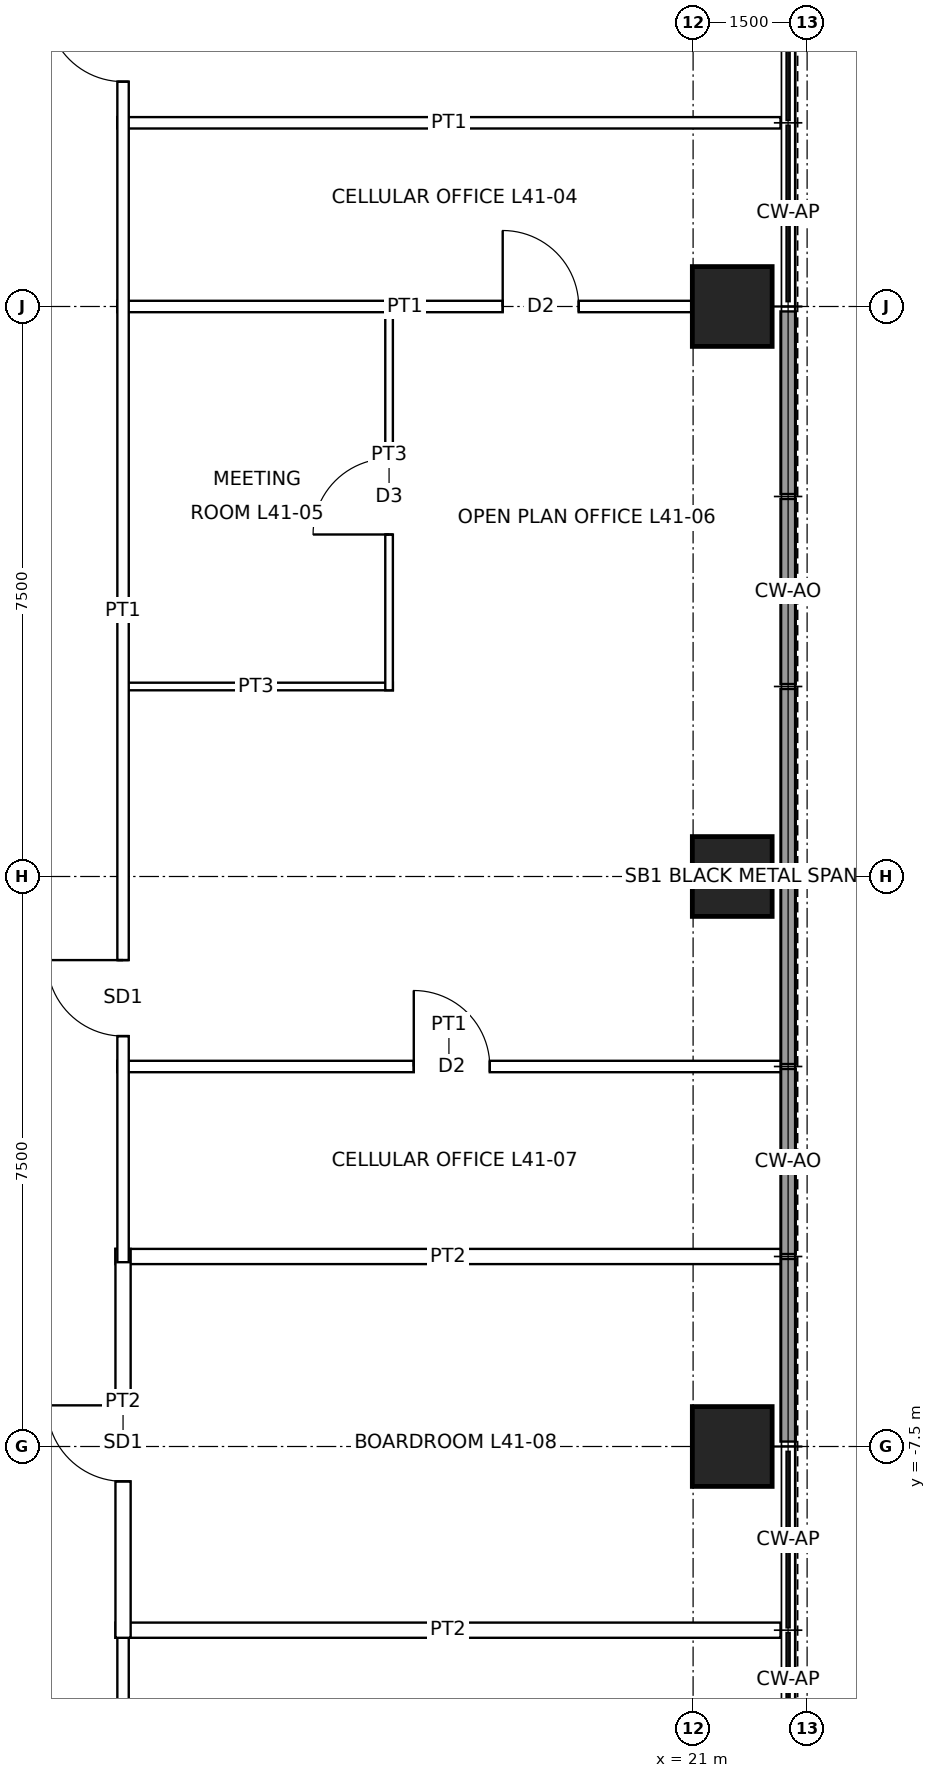
"""IFC4 building model, lengths in metres.
Left out: names, types, materials, properties, quantities, classifications, styles, units other than length and angle.
Written with IfcOpenShell. Run it as: python <this file> out.ifc"""

import sys

from ifc_helpers import new_model, si_unit, direction, frame, frame_2d, origin, origin_2d, place, context, subcontext, project, spatial, rectangle, hollow_rectangle, extrude, element, fill, save


model = new_model("IFC4")
c1 = context("Model", 3, precision=1e-05, world=origin(), true_north=direction((0.0, 1.0)))
c2 = subcontext(c1, "Body", "Model", "MODEL_VIEW")
j1 = project(units=[si_unit("LENGTHUNIT", "METRE"), si_unit("PLANEANGLEUNIT", "RADIAN")], contexts=[c1])
p1 = place(None, origin())
s1 = spatial("IfcSite", under=j1, at=p1, CompositionType="ELEMENT")
p2 = place(p1, origin())
s2 = spatial("IfcBuilding", under=s1, at=p2, CompositionType="ELEMENT")
p3 = place(p2, frame((0.0, 0.0, 197.9)))
s3 = spatial("IfcBuildingStorey", under=s2, at=p3, CompositionType="ELEMENT", Elevation=197.9)
for number, where, z_axis, x_axis in (
    (1, (21.515, 7.5, 0.0), (0.0, 0.0, 1.0), (1.0, 0.0, 0.0)),
    (2, (21.515, 0.0, 0.0), (0.0, 0.0, 1.0), (1.0, 0.0, 0.0)),
    (3, (21.515, -7.5, 0.0), (0.0, 0.0, 1.0), (1.0, 0.0, 0.0)),
):
    element("IfcColumn", number, at=place(p3, frame(where, z_axis=z_axis, x_axis=x_axis)), inside=s3, PredefinedType="COLUMN", context=c2, shape_type="SweptSolid", body=[
        extrude(hollow_rectangle(XDim=1.05, YDim=1.05, WallThickness=0.07, at=origin_2d()), origin(), (0.0, 0.0, 1.0), 4.0),
    ])
p4 = place(p3, frame((22.25, 7.435, 0.0), z_axis=(0.0, 0.0, 1.0), x_axis=(0.0, -1.0, 0.0)))
e4 = element("IfcWall", 4, at=p4, inside=s3, PredefinedType="SOLIDWALL", context=c2, shape_type="SweptSolid", body=[
    extrude(rectangle(XDim=2.403, YDim=0.2, at=frame_2d((1.201, 0.0))), origin(), (0.0, 0.0, 1.0), 3.85),
])
p5 = place(p3, frame((22.25, 4.968, 0.0), z_axis=(0.0, 0.0, 1.0), x_axis=(0.0, -1.0, 0.0)))
e5 = element("IfcWall", 5, at=p5, inside=s3, PredefinedType="SOLIDWALL", context=c2, shape_type="SweptSolid", body=[
    extrude(rectangle(XDim=2.435, YDim=0.2, at=frame_2d((1.218, 0.0))), origin(), (0.0, 0.0, 1.0), 3.85),
])
for number, where, z_axis, x_axis in (
    (6, (22.25, 2.468, 0.0), (0.0, 0.0, 1.0), (0.0, -1.0, 0.0)),
    (7, (22.25, -0.065, 0.0), (0.0, 0.0, 1.0), (0.0, -1.0, 0.0)),
):
    element("IfcWall", number, at=place(p3, frame(where, z_axis=z_axis, x_axis=x_axis)), inside=s3, PredefinedType="SOLIDWALL", context=c2, shape_type="SweptSolid", body=[
        extrude(rectangle(XDim=2.403, YDim=0.2, at=frame_2d((1.201, 0.0))), origin(), (0.0, 0.0, 1.0), 3.85),
    ])
p6 = place(p3, frame((22.25, -2.532, 0.0), z_axis=(0.0, 0.0, 1.0), x_axis=(0.0, -1.0, 0.0)))
e8 = element("IfcWall", 8, at=p6, inside=s3, PredefinedType="SOLIDWALL", context=c2, shape_type="SweptSolid", body=[
    extrude(rectangle(XDim=2.435, YDim=0.2, at=frame_2d((1.218, 0.0))), origin(), (0.0, 0.0, 1.0), 3.85),
])
p7 = place(p3, frame((22.25, -5.032, 0.0), z_axis=(0.0, 0.0, 1.0), x_axis=(0.0, -1.0, 0.0)))
e9 = element("IfcWall", 9, at=p7, inside=s3, PredefinedType="SOLIDWALL", context=c2, shape_type="SweptSolid", body=[
    extrude(rectangle(XDim=2.403, YDim=0.2, at=frame_2d((1.201, 0.0))), origin(), (0.0, 0.0, 1.0), 3.85),
])
for number, where, z_axis, x_axis in (
    (10, (13.4, -9.917, 0.0), (0.0, 0.0, 1.0), (1.0, 0.0, 0.0)),
    (11, (13.4, -5.0, 0.0), (0.0, 0.0, 1.0), (1.0, 0.0, 0.0)),
):
    element("IfcWall", number, at=place(p3, frame(where, z_axis=z_axis, x_axis=x_axis)), inside=s3, PredefinedType="PARTITIONING", context=c2, shape_type="SweptSolid", body=[
        extrude(rectangle(XDim=8.75, YDim=0.2, at=frame_2d((4.375, 0.0))), origin(), (0.0, 0.0, 1.0), 3.85),
    ])
p8 = place(p3, frame((13.425, -2.5, 0.0), z_axis=(0.0, 0.0, 1.0), x_axis=(1.0, 0.0, 0.0)))
e12 = element("IfcWall", 12, at=p8, inside=s3, PredefinedType="PARTITIONING", context=c2, shape_type="SweptSolid", body=[
    extrude(rectangle(XDim=8.725, YDim=0.15, at=frame_2d((4.362, 0.0))), origin(), (0.0, 0.0, 1.0), 3.85),
])
p9 = place(p8, frame((3.9, 0.0, 0.0)))
e13 = element("IfcOpeningElement", 13, at=p9, cuts=e12, PredefinedType="OPENING", context=c2, shape_type="SweptSolid", body=[
    extrude(rectangle(XDim=1.0, YDim=2.1, at=frame_2d((0.5, 1.05))), frame((0.0, 0.085, 0.0), z_axis=(0.0, -1.0, 0.0), x_axis=(1.0, 0.0, 0.0)), (0.0, 0.0, 1.0), 0.17),
])
p10 = place(p3, frame((13.45, 2.5, 0.0), z_axis=(0.0, 0.0, 1.0), x_axis=(1.0, 0.0, 0.0)))
e14 = element("IfcWall", 14, at=p10, inside=s3, PredefinedType="PARTITIONING", context=c2, shape_type="SweptSolid", body=[
    extrude(rectangle(XDim=3.6, YDim=0.1, at=frame_2d((1.8, 0.0))), origin(), (0.0, 0.0, 1.0), 3.85),
])
p11 = place(p3, frame((13.425, 7.5, 0.0), z_axis=(0.0, 0.0, 1.0), x_axis=(1.0, 0.0, 0.0)))
e15 = element("IfcWall", 15, at=p11, inside=s3, PredefinedType="PARTITIONING", context=c2, shape_type="SweptSolid", body=[
    extrude(rectangle(XDim=7.565, YDim=0.15, at=frame_2d((3.782, 0.0))), origin(), (0.0, 0.0, 1.0), 3.238),
])
p12 = place(p11, frame((5.07, 0.0, 0.0)))
e16 = element("IfcOpeningElement", 16, at=p12, cuts=e15, PredefinedType="OPENING", context=c2, shape_type="SweptSolid", body=[
    extrude(rectangle(XDim=1.0, YDim=2.1, at=frame_2d((0.5, 1.05))), frame((0.0, 0.085, 0.0), z_axis=(0.0, -1.0, 0.0), x_axis=(1.0, 0.0, 0.0)), (0.0, 0.0, 1.0), 0.17),
])
p13 = place(p3, frame((13.425, 9.917, 0.0), z_axis=(0.0, 0.0, 1.0), x_axis=(1.0, 0.0, 0.0)))
e17 = element("IfcWall", 17, at=p13, inside=s3, PredefinedType="PARTITIONING", context=c2, shape_type="SweptSolid", body=[
    extrude(rectangle(XDim=8.725, YDim=0.15, at=frame_2d((4.362, 0.0))), origin(), (0.0, 0.0, 1.0), 3.85),
])
p14 = place(p3, frame((13.5, -13.575, 0.0), z_axis=(0.0, 0.0, 1.0), x_axis=(0.0, 1.0, 0.0)))
e18 = element("IfcWall", 18, at=p14, inside=s3, PredefinedType="PARTITIONING", context=c2, shape_type="SweptSolid", body=[
    extrude(rectangle(XDim=3.733, YDim=0.15, at=frame_2d((1.866, 0.0))), origin(), (0.0, 0.0, 1.0), 3.85),
])
p15 = place(p3, frame((13.5, -10.017, 0.0), z_axis=(0.0, 0.0, 1.0), x_axis=(0.0, 1.0, 0.0)))
e19 = element("IfcWall", 19, at=p15, inside=s3, PredefinedType="PARTITIONING", context=c2, shape_type="SweptSolid", body=[
    extrude(rectangle(XDim=5.117, YDim=0.2, at=frame_2d((2.559, 0.0))), origin(), (0.0, 0.0, 1.0), 3.85),
])
p16 = place(p15, frame((2.059, 0.0, 0.0)))
e20 = element("IfcOpeningElement", 20, at=p16, cuts=e19, PredefinedType="OPENING", context=c2, shape_type="SweptSolid", body=[
    extrude(rectangle(XDim=1.0, YDim=2.4, at=frame_2d((0.5, 1.2))), frame((0.0, 0.11, 0.0), z_axis=(0.0, -1.0, 0.0), x_axis=(1.0, 0.0, 0.0)), (0.0, 0.0, 1.0), 0.22),
])
p17 = place(p3, frame((13.5, -5.075, 0.0), z_axis=(0.0, 0.0, 1.0), x_axis=(0.0, 1.0, 0.0)))
e21 = element("IfcWall", 21, at=p17, inside=s3, PredefinedType="PARTITIONING", context=c2, shape_type="SweptSolid", body=[
    extrude(rectangle(XDim=17.15, YDim=0.15, at=frame_2d((8.575, 0.0))), origin(), (0.0, 0.0, 1.0), 3.85),
])
p18 = place(p17, frame((2.975, 0.0, 0.0)))
e22 = element("IfcOpeningElement", 22, at=p18, cuts=e21, PredefinedType="OPENING", context=c2, shape_type="SweptSolid", body=[
    extrude(rectangle(XDim=1.0, YDim=2.4, at=frame_2d((0.5, 1.2))), frame((0.0, 0.085, 0.0), z_axis=(0.0, -1.0, 0.0), x_axis=(1.0, 0.0, 0.0)), (0.0, 0.0, 1.0), 0.17),
])
p19 = place(p17, frame((15.533, 0.0, 0.0)))
e23 = element("IfcOpeningElement", 23, at=p19, cuts=e21, PredefinedType="OPENING", context=c2, shape_type="SweptSolid", body=[
    extrude(rectangle(XDim=1.0, YDim=2.4, at=frame_2d((0.5, 1.2))), frame((0.0, 0.085, 0.0), z_axis=(0.0, -1.0, 0.0), x_axis=(1.0, 0.0, 0.0)), (0.0, 0.0, 1.0), 0.17),
])
p20 = place(p3, frame((17.0, 2.45, 0.0), z_axis=(0.0, 0.0, 1.0), x_axis=(0.0, 1.0, 0.0)))
e24 = element("IfcWall", 24, at=p20, inside=s3, PredefinedType="PARTITIONING", context=c2, shape_type="SweptSolid", body=[
    extrude(rectangle(XDim=5.1, YDim=0.1, at=frame_2d((2.55, 0.0))), origin(), (0.0, 0.0, 1.0), 3.85),
])
p21 = place(p20, frame((2.05, 0.0, 0.0)))
e25 = element("IfcOpeningElement", 25, at=p21, cuts=e24, PredefinedType="OPENING", context=c2, shape_type="SweptSolid", body=[
    extrude(rectangle(XDim=1.0, YDim=2.1, at=frame_2d((0.5, 1.05))), frame((0.0, 0.06, 0.0), z_axis=(0.0, -1.0, 0.0), x_axis=(1.0, 0.0, 0.0)), (0.0, 0.0, 1.0), 0.12),
])
p22 = place(p12, origin())
e26 = element("IfcDoor", 26, at=p22, inside=s3, OperationType="SINGLE_SWING_LEFT", PredefinedType="DOOR", context=c2, shape_type="SweptSolid", body=[
    extrude(rectangle(XDim=1.0, YDim=2.1, at=frame_2d((0.5, 1.05))), frame((0.0, 0.025, 0.0), z_axis=(0.0, -1.0, 0.0), x_axis=(1.0, 0.0, 0.0)), (0.0, 0.0, 1.0), 0.05),
])
fill(e16, e26)
p23 = place(p21, origin())
e27 = element("IfcDoor", 27, at=p23, inside=s3, OperationType="SINGLE_SWING_LEFT", PredefinedType="DOOR", context=c2, shape_type="SweptSolid", body=[
    extrude(rectangle(XDim=1.0, YDim=2.1, at=frame_2d((0.5, 1.05))), frame((0.0, 0.025, 0.0), z_axis=(0.0, -1.0, 0.0), x_axis=(1.0, 0.0, 0.0)), (0.0, 0.0, 1.0), 0.05),
])
fill(e25, e27)
p24 = place(p18, origin())
e28 = element("IfcDoor", 28, at=p24, inside=s3, OperationType="SINGLE_SWING_RIGHT", PredefinedType="DOOR", context=c2, shape_type="SweptSolid", body=[
    extrude(rectangle(XDim=1.0, YDim=2.4, at=frame_2d((0.5, 1.2))), frame((0.0, 0.025, 0.0), z_axis=(0.0, -1.0, 0.0), x_axis=(1.0, 0.0, 0.0)), (0.0, 0.0, 1.0), 0.05),
])
fill(e22, e28)
p25 = place(p9, origin())
e29 = element("IfcDoor", 29, at=p25, inside=s3, OperationType="SINGLE_SWING_LEFT", PredefinedType="DOOR", context=c2, shape_type="SweptSolid", body=[
    extrude(rectangle(XDim=1.0, YDim=2.1, at=frame_2d((0.5, 1.05))), frame((0.0, 0.025, 0.0), z_axis=(0.0, -1.0, 0.0), x_axis=(1.0, 0.0, 0.0)), (0.0, 0.0, 1.0), 0.05),
])
fill(e13, e29)
p26 = place(p16, origin())
e30 = element("IfcDoor", 30, at=p26, inside=s3, OperationType="SINGLE_SWING_RIGHT", PredefinedType="DOOR", context=c2, shape_type="SweptSolid", body=[
    extrude(rectangle(XDim=1.0, YDim=2.4, at=frame_2d((0.5, 1.2))), frame((0.0, 0.025, 0.0), z_axis=(0.0, -1.0, 0.0), x_axis=(1.0, 0.0, 0.0)), (0.0, 0.0, 1.0), 0.05),
])
fill(e20, e30)
p27 = place(p19, origin())
e31 = element("IfcDoor", 31, at=p27, inside=s3, OperationType="SINGLE_SWING_RIGHT", PredefinedType="DOOR", context=c2, shape_type="SweptSolid", body=[
    extrude(rectangle(XDim=1.0, YDim=2.4, at=frame_2d((0.5, 1.2))), frame((0.0, 0.025, 0.0), z_axis=(0.0, -1.0, 0.0), x_axis=(1.0, 0.0, 0.0)), (0.0, 0.0, 1.0), 0.05),
])
fill(e23, e31)
save(model, sys.argv[1])
